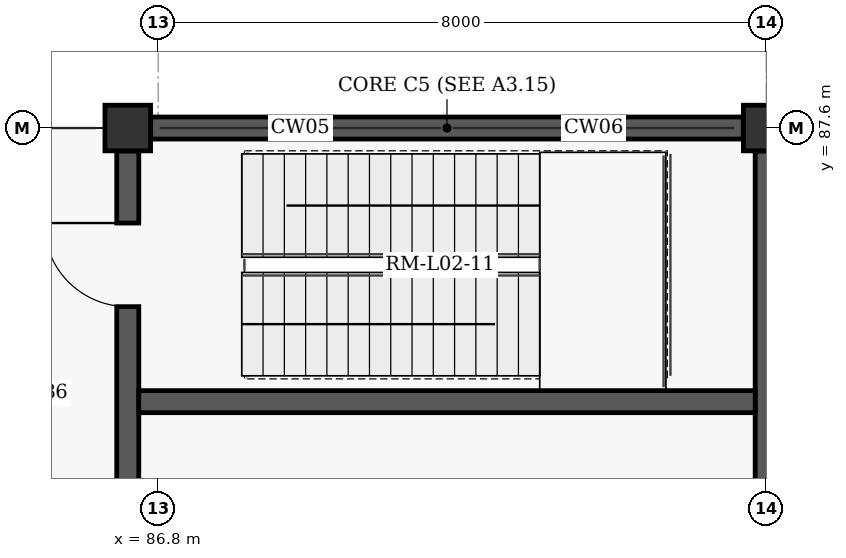
"""IFC4 building model, lengths in metres.
Left out: names, types, materials, properties, quantities, classifications, styles, units other than length and angle.
Written with IfcOpenShell. Run it as: python <this file> out.ifc"""

import sys

from ifc_helpers import new_model, si_unit, direction, frame, frame_2d, origin, origin_2d, place, context, subcontext, project, spatial, rectangle, extrude, element, fill, save


model = new_model("IFC4")
c1 = context("Model", 3, precision=1e-05, world=origin(), true_north=direction((0.0, 1.0)))
c2 = subcontext(c1, "Body", "Model", "MODEL_VIEW")
j1 = project(units=[si_unit("LENGTHUNIT", "METRE"), si_unit("PLANEANGLEUNIT", "RADIAN")], contexts=[c1])
p1 = place(None, origin())
s1 = spatial("IfcSite", under=j1, at=p1, CompositionType="ELEMENT")
p2 = place(p1, origin())
s2 = spatial("IfcBuilding", under=s1, at=p2, CompositionType="ELEMENT")
p3 = place(p2, frame((0.0, 0.0, 10.2)))
s3 = spatial("IfcBuildingStorey", under=s2, at=p3, CompositionType="ELEMENT", Elevation=10.2)
for number, where, z_axis, x_axis in (
    (1, (86.4, 87.6, 0.0), (0.0, 0.0, 1.0), (1.0, 0.0, 0.0)),
    (2, (94.8, 87.6, 0.0), (0.0, 0.0, 1.0), (1.0, 0.0, 0.0)),
):
    element("IfcColumn", number, at=place(p3, frame(where, z_axis=z_axis, x_axis=x_axis)), inside=s3, PredefinedType="COLUMN", context=c2, shape_type="SweptSolid", body=[
        extrude(rectangle(XDim=0.6, YDim=0.6, at=origin_2d()), origin(), (0.0, 0.0, 1.0), 5.4),
    ])
p4 = place(p3, frame((86.702, 87.6, 0.0), z_axis=(0.0, 0.0, 1.0), x_axis=(1.0, 0.0, 0.0)))
e3 = element("IfcWall", 3, at=p4, inside=s3, PredefinedType="SHEAR", context=c2, shape_type="SweptSolid", body=[
    extrude(rectangle(XDim=7.796, YDim=0.29, at=frame_2d((3.898, 0.0))), origin(), (0.0, 0.0, 1.0), 5.16),
])
p5 = place(p3, frame((86.4, 79.902, 0.0), z_axis=(0.0, 0.0, 1.0), x_axis=(0.0, 1.0, 0.0)))
e4 = element("IfcWall", 4, at=p5, inside=s3, PredefinedType="SHEAR", context=c2, shape_type="SweptSolid", body=[
    extrude(rectangle(XDim=7.396, YDim=0.29, at=frame_2d((3.698, 0.0))), origin(), (0.0, 0.0, 1.0), 5.16),
])
p6 = place(p5, frame((5.348, 0.0, 0.0)))
e5 = element("IfcOpeningElement", 5, at=p6, cuts=e4, PredefinedType="OPENING", context=c2, shape_type="SweptSolid", body=[
    extrude(rectangle(XDim=1.1, YDim=2.15, at=frame_2d((0.55, 1.075))), frame((0.0, 0.155, 0.0), z_axis=(0.0, -1.0, 0.0), x_axis=(1.0, 0.0, 0.0)), (0.0, 0.0, 1.0), 0.31),
])
p7 = place(p5, frame((1.323, 0.0, 0.0)))
e6 = element("IfcOpeningElement", 6, at=p7, cuts=e4, PredefinedType="OPENING", context=c2, shape_type="SweptSolid", body=[
    extrude(rectangle(XDim=1.15, YDim=2.2, at=frame_2d((0.575, 1.1))), frame((0.0, 0.155, 0.0), z_axis=(0.0, -1.0, 0.0), x_axis=(1.0, 0.0, 0.0)), (0.0, 0.0, 1.0), 0.31),
])
p8 = place(p3, frame((94.8, 79.902, 0.0), z_axis=(0.0, 0.0, 1.0), x_axis=(0.0, 1.0, 0.0)))
e7 = element("IfcWall", 7, at=p8, inside=s3, PredefinedType="SHEAR", context=c2, shape_type="SweptSolid", body=[
    extrude(rectangle(XDim=7.396, YDim=0.29, at=frame_2d((3.698, 0.0))), origin(), (0.0, 0.0, 1.0), 5.16),
])
p9 = place(p3, frame((86.545, 84.0, 0.0), z_axis=(0.0, 0.0, 1.0), x_axis=(1.0, 0.0, 0.0)))
e8 = element("IfcWall", 8, at=p9, inside=s3, PredefinedType="SHEAR", context=c2, shape_type="SweptSolid", body=[
    extrude(rectangle(XDim=8.11, YDim=0.29, at=frame_2d((4.055, 0.0))), origin(), (0.0, 0.0, 1.0), 5.16),
])
p10 = place(p6, origin())
e9 = element("IfcDoor", 9, at=p10, inside=s3, OperationType="SINGLE_SWING_RIGHT", PredefinedType="DOOR", context=c2, shape_type="SweptSolid", body=[
    extrude(rectangle(XDim=1.1, YDim=2.15, at=frame_2d((0.55, 1.075))), frame((0.0, 0.025, 0.0), z_axis=(0.0, -1.0, 0.0), x_axis=(1.0, 0.0, 0.0)), (0.0, 0.0, 1.0), 0.05),
])
fill(e5, e9)
save(model, sys.argv[1])
